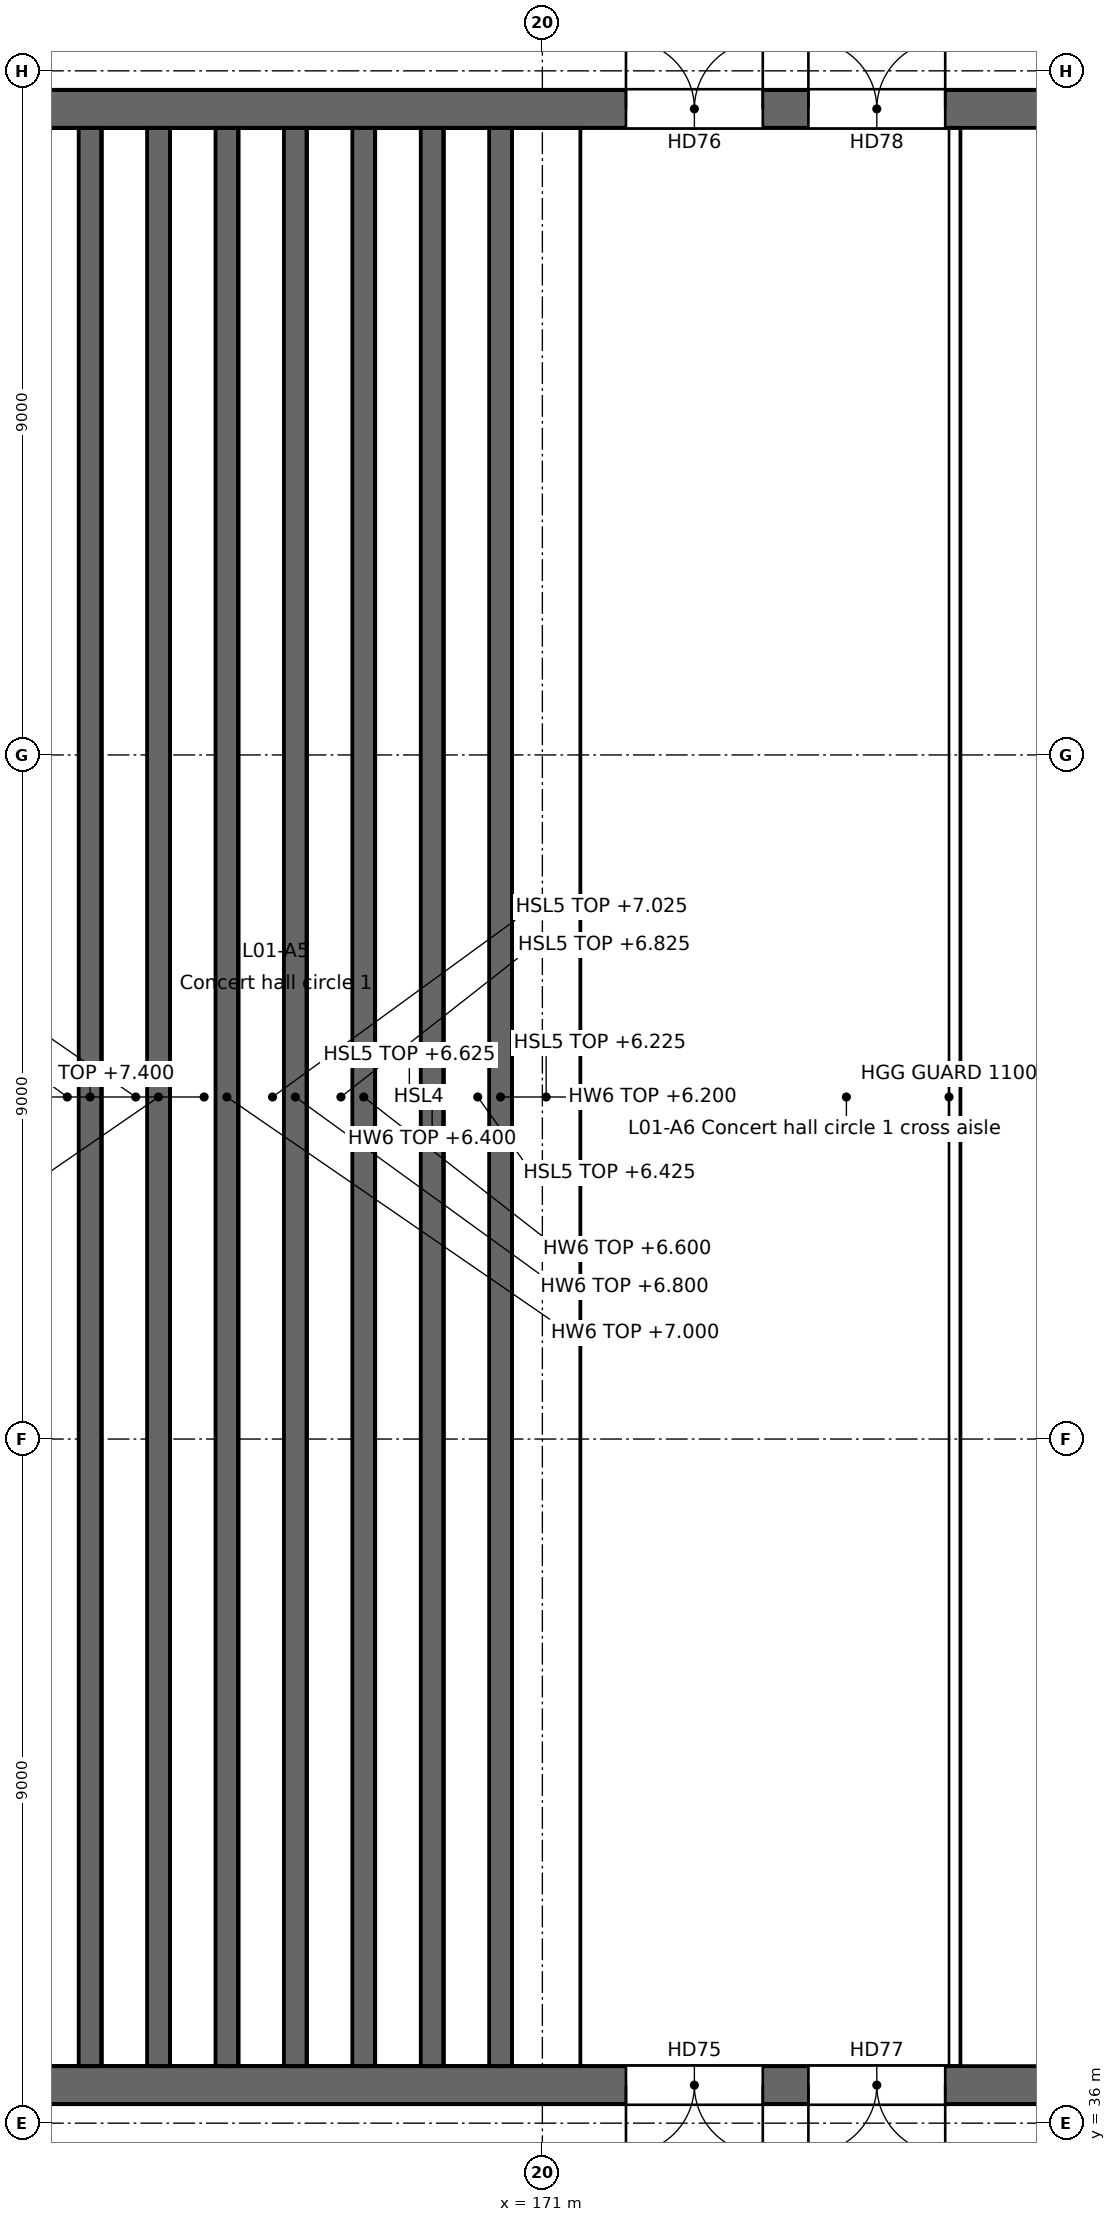
"""IFC4 building model, lengths in metres.
Left out: names, types, materials, properties, quantities, classifications, styles, units other than length and angle.
Written with IfcOpenShell. Run it as: python <this file> out.ifc"""

import sys

from ifc_helpers import new_model, si_unit, direction, frame, frame_2d, origin, place, context, subcontext, project, spatial, rectangle, extrude, element, fill, save


model = new_model("IFC4")
c1 = context("Model", 3, precision=1e-05, world=origin(), true_north=direction((0.0, 1.0)))
c2 = subcontext(c1, "Body", "Model", "MODEL_VIEW")
j1 = project(units=[si_unit("LENGTHUNIT", "METRE"), si_unit("PLANEANGLEUNIT", "RADIAN")], contexts=[c1])
p1 = place(None, origin())
s1 = spatial("IfcSite", under=j1, at=p1, CompositionType="ELEMENT")
p2 = place(p1, origin())
s2 = spatial("IfcBuilding", under=s1, at=p2, CompositionType="ELEMENT")
p3 = place(p2, frame((0.0, 0.0, 6.0)))
s3 = spatial("IfcBuildingStorey", under=s2, at=p3, CompositionType="ELEMENT", Elevation=6.0)
p4 = place(p3, frame((209.6, 36.5, -0.35), z_axis=(0.0, 0.0, 1.0), x_axis=(-1.0, 0.0, 0.0)))
e1 = element("IfcWall", 1, at=p4, inside=s3, PredefinedType="SOLIDWALL", context=c2, shape_type="SweptSolid", body=[
    extrude(rectangle(XDim=47.35, YDim=0.5, at=frame_2d((23.675, 0.0))), origin(), (0.0, 0.0, 1.0), 5.4),
])
p5 = place(p4, frame((35.7, 0.0, 0.35)))
e2 = element("IfcOpeningElement", 2, at=p5, cuts=e1, PredefinedType="OPENING", context=c2, shape_type="SweptSolid", body=[
    extrude(rectangle(XDim=1.8, YDim=2.4, at=frame_2d((0.9, 1.2))), frame((0.0, 0.25, 0.0), z_axis=(0.0, -1.0, 0.0), x_axis=(1.0, 0.0, 0.0)), (0.0, 0.0, 1.0), 0.5),
])
p6 = place(p4, frame((33.3, 0.0, 0.35)))
e3 = element("IfcOpeningElement", 3, at=p6, cuts=e1, PredefinedType="OPENING", context=c2, shape_type="SweptSolid", body=[
    extrude(rectangle(XDim=1.8, YDim=2.4, at=frame_2d((0.9, 1.2))), frame((0.0, 0.25, 0.0), z_axis=(0.0, -1.0, 0.0), x_axis=(1.0, 0.0, 0.0)), (0.0, 0.0, 1.0), 0.5),
])
p7 = place(p3, frame((162.25, 62.5, -0.35), z_axis=(0.0, 0.0, 1.0), x_axis=(1.0, 0.0, 0.0)))
e4 = element("IfcWall", 4, at=p7, inside=s3, PredefinedType="SOLIDWALL", context=c2, shape_type="SweptSolid", body=[
    extrude(rectangle(XDim=47.35, YDim=0.5, at=frame_2d((23.675, 0.0))), origin(), (0.0, 0.0, 1.0), 5.4),
])
p8 = place(p7, frame((9.85, 0.0, 0.35)))
e5 = element("IfcOpeningElement", 5, at=p8, cuts=e4, PredefinedType="OPENING", context=c2, shape_type="SweptSolid", body=[
    extrude(rectangle(XDim=1.8, YDim=2.4, at=frame_2d((0.9, 1.2))), frame((0.0, 0.25, 0.0), z_axis=(0.0, -1.0, 0.0), x_axis=(1.0, 0.0, 0.0)), (0.0, 0.0, 1.0), 0.5),
])
p9 = place(p7, frame((12.25, 0.0, 0.35)))
e6 = element("IfcOpeningElement", 6, at=p9, cuts=e4, PredefinedType="OPENING", context=c2, shape_type="SweptSolid", body=[
    extrude(rectangle(XDim=1.8, YDim=2.4, at=frame_2d((0.9, 1.2))), frame((0.0, 0.25, 0.0), z_axis=(0.0, -1.0, 0.0), x_axis=(1.0, 0.0, 0.0)), (0.0, 0.0, 1.0), 0.5),
])
p10 = place(p3, frame((170.45, 36.75, 0.0), z_axis=(0.0, 0.0, 1.0), x_axis=(0.0, 1.0, 0.0)))
e7 = element("IfcWall", 7, at=p10, inside=s3, PredefinedType="SOLIDWALL", context=c2, shape_type="SweptSolid", body=[
    extrude(rectangle(XDim=25.5, YDim=0.3, at=frame_2d((12.75, 0.0))), origin(), (0.0, 0.0, 1.0), 0.2),
])
p11 = place(p3, frame((169.55, 36.75, 0.0), z_axis=(0.0, 0.0, 1.0), x_axis=(0.0, 1.0, 0.0)))
e8 = element("IfcWall", 8, at=p11, inside=s3, PredefinedType="SOLIDWALL", context=c2, shape_type="SweptSolid", body=[
    extrude(rectangle(XDim=25.5, YDim=0.3, at=frame_2d((12.75, 0.0))), origin(), (0.0, 0.0, 1.0), 0.4),
])
p12 = place(p3, frame((168.65, 36.75, 0.0), z_axis=(0.0, 0.0, 1.0), x_axis=(0.0, 1.0, 0.0)))
e9 = element("IfcWall", 9, at=p12, inside=s3, PredefinedType="SOLIDWALL", context=c2, shape_type="SweptSolid", body=[
    extrude(rectangle(XDim=25.5, YDim=0.3, at=frame_2d((12.75, 0.0))), origin(), (0.0, 0.0, 1.0), 0.6),
])
p13 = place(p3, frame((167.75, 36.75, 0.0), z_axis=(0.0, 0.0, 1.0), x_axis=(0.0, 1.0, 0.0)))
e10 = element("IfcWall", 10, at=p13, inside=s3, PredefinedType="SOLIDWALL", context=c2, shape_type="SweptSolid", body=[
    extrude(rectangle(XDim=25.5, YDim=0.3, at=frame_2d((12.75, 0.0))), origin(), (0.0, 0.0, 1.0), 0.8),
])
p14 = place(p3, frame((166.85, 36.75, 0.0), z_axis=(0.0, 0.0, 1.0), x_axis=(0.0, 1.0, 0.0)))
e11 = element("IfcWall", 11, at=p14, inside=s3, PredefinedType="SOLIDWALL", context=c2, shape_type="SweptSolid", body=[
    extrude(rectangle(XDim=25.5, YDim=0.3, at=frame_2d((12.75, 0.0))), origin(), (0.0, 0.0, 1.0), 1.0),
])
p15 = place(p3, frame((165.95, 36.75, 0.0), z_axis=(0.0, 0.0, 1.0), x_axis=(0.0, 1.0, 0.0)))
e12 = element("IfcWall", 12, at=p15, inside=s3, PredefinedType="SOLIDWALL", context=c2, shape_type="SweptSolid", body=[
    extrude(rectangle(XDim=25.5, YDim=0.3, at=frame_2d((12.75, 0.0))), origin(), (0.0, 0.0, 1.0), 1.2),
])
p16 = place(p3, frame((165.05, 36.75, 0.0), z_axis=(0.0, 0.0, 1.0), x_axis=(0.0, 1.0, 0.0)))
e13 = element("IfcWall", 13, at=p16, inside=s3, PredefinedType="SOLIDWALL", context=c2, shape_type="SweptSolid", body=[
    extrude(rectangle(XDim=25.5, YDim=0.3, at=frame_2d((12.75, 0.0))), origin(), (0.0, 0.0, 1.0), 1.4),
])
p17 = place(p5, origin())
e14 = element("IfcDoor", 14, at=p17, inside=s3, OperationType="DOUBLE_DOOR_SINGLE_SWING", PredefinedType="DOOR", context=c2, shape_type="SweptSolid", body=[
    extrude(rectangle(XDim=1.8, YDim=2.4, at=frame_2d((0.9, 1.2))), frame((0.0, 0.025, 0.0), z_axis=(0.0, -1.0, 0.0), x_axis=(1.0, 0.0, 0.0)), (0.0, 0.0, 1.0), 0.05),
])
fill(e2, e14)
p18 = place(p8, origin())
e15 = element("IfcDoor", 15, at=p18, inside=s3, OperationType="DOUBLE_DOOR_SINGLE_SWING", PredefinedType="DOOR", context=c2, shape_type="SweptSolid", body=[
    extrude(rectangle(XDim=1.8, YDim=2.4, at=frame_2d((0.9, 1.2))), frame((0.0, 0.025, 0.0), z_axis=(0.0, -1.0, 0.0), x_axis=(1.0, 0.0, 0.0)), (0.0, 0.0, 1.0), 0.05),
])
fill(e5, e15)
p19 = place(p6, origin())
e16 = element("IfcDoor", 16, at=p19, inside=s3, OperationType="DOUBLE_DOOR_SINGLE_SWING", PredefinedType="DOOR", context=c2, shape_type="SweptSolid", body=[
    extrude(rectangle(XDim=1.8, YDim=2.4, at=frame_2d((0.9, 1.2))), frame((0.0, 0.025, 0.0), z_axis=(0.0, -1.0, 0.0), x_axis=(1.0, 0.0, 0.0)), (0.0, 0.0, 1.0), 0.05),
])
fill(e3, e16)
p20 = place(p9, origin())
e17 = element("IfcDoor", 17, at=p20, inside=s3, OperationType="DOUBLE_DOOR_SINGLE_SWING", PredefinedType="DOOR", context=c2, shape_type="SweptSolid", body=[
    extrude(rectangle(XDim=1.8, YDim=2.4, at=frame_2d((0.9, 1.2))), frame((0.0, 0.025, 0.0), z_axis=(0.0, -1.0, 0.0), x_axis=(1.0, 0.0, 0.0)), (0.0, 0.0, 1.0), 0.05),
])
fill(e6, e17)
save(model, sys.argv[1])
